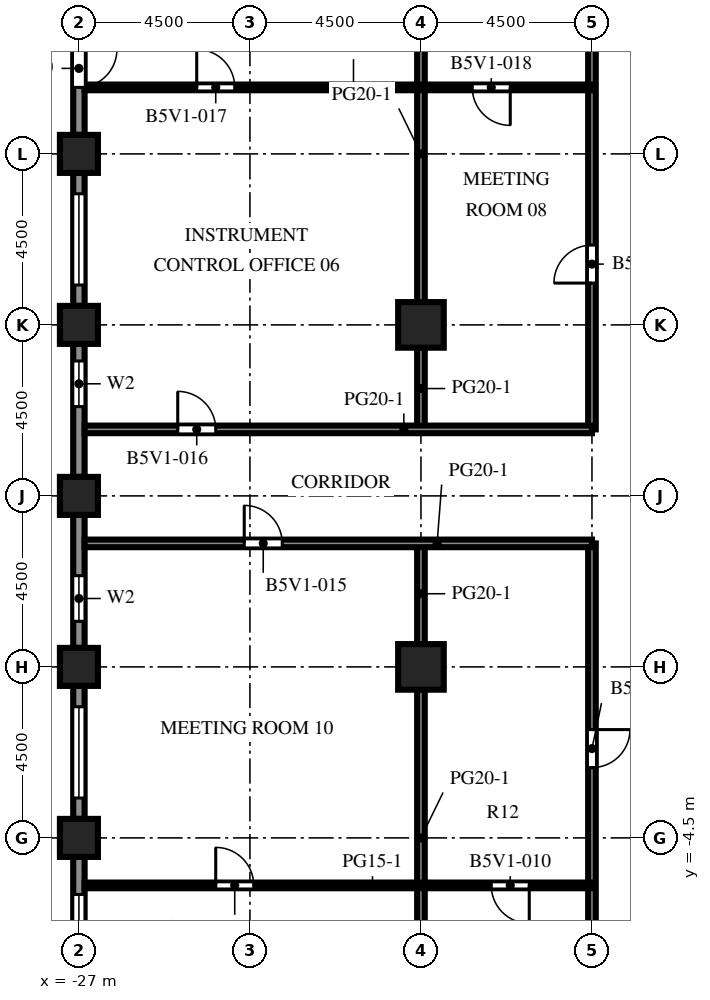
"""IFC4 building model, lengths in metres.
Left out: names, types, materials, properties, quantities, classifications, styles, units other than length and angle.
Written with IfcOpenShell. Run it as: python <this file> out.ifc"""

import sys

from ifc_helpers import new_model, si_unit, direction, frame, frame_2d, origin, origin_2d, place, context, subcontext, project, spatial, rectangle, extrude, element, fill, save


model = new_model("IFC4")
c1 = context("Model", 3, precision=1e-05, world=origin(), true_north=direction((0.0, 1.0)))
c2 = subcontext(c1, "Body", "Model", "MODEL_VIEW")
j1 = project(units=[si_unit("LENGTHUNIT", "METRE"), si_unit("PLANEANGLEUNIT", "RADIAN")], contexts=[c1])
p1 = place(None, origin())
s1 = spatial("IfcSite", under=j1, at=p1, CompositionType="ELEMENT")
p2 = place(p1, origin())
s2 = spatial("IfcBuilding", under=s1, at=p2, CompositionType="ELEMENT")
p3 = place(p2, frame((0.0, 0.0, 169.1)))
s3 = spatial("IfcBuildingStorey", under=s2, at=p3, CompositionType="ELEMENT", Elevation=169.1)
for number, where, z_axis, x_axis in (
    (1, (-27.0, -4.5, 0.0), (0.0, 0.0, 1.0), (1.0, 0.0, 0.0)),
    (2, (-27.0, 0.0, 0.0), (0.0, 0.0, 1.0), (1.0, 0.0, 0.0)),
    (3, (-27.0, 4.5, 0.0), (0.0, 0.0, 1.0), (1.0, 0.0, 0.0)),
    (4, (-27.0, 9.0, 0.0), (0.0, 0.0, 1.0), (1.0, 0.0, 0.0)),
    (5, (-27.0, 13.5, 0.0), (0.0, 0.0, 1.0), (1.0, 0.0, 0.0)),
):
    element("IfcColumn", number, at=place(p3, frame(where, z_axis=z_axis, x_axis=x_axis)), inside=s3, PredefinedType="COLUMN", context=c2, shape_type="SweptSolid", body=[
        extrude(rectangle(XDim=1.0, YDim=1.0, at=origin_2d()), origin(), (0.0, 0.0, 1.0), 4.1),
    ])
for number, where, z_axis, x_axis in (
    (6, (-18.0, 0.0, 0.0), (0.0, 0.0, 1.0), (1.0, 0.0, 0.0)),
    (7, (-18.0, 9.0, 0.0), (0.0, 0.0, 1.0), (1.0, 0.0, 0.0)),
):
    element("IfcColumn", number, at=place(p3, frame(where, z_axis=z_axis, x_axis=x_axis)), inside=s3, PredefinedType="COLUMN", context=c2, shape_type="SweptSolid", body=[
        extrude(rectangle(XDim=1.2, YDim=1.2, at=origin_2d()), origin(), (0.0, 0.0, 1.0), 4.1),
    ])
p4 = place(p3, frame((-27.0, 14.0, 0.0), z_axis=(0.0, 0.0, 1.0), x_axis=(0.0, 1.0, 0.0)))
e8 = element("IfcWall", 8, at=p4, inside=s3, PredefinedType="SOLIDWALL", context=c2, shape_type="SweptSolid", body=[
    extrude(rectangle(XDim=3.5, YDim=0.3, at=frame_2d((1.75, 0.0))), origin(), (0.0, 0.0, 1.0), 2.85),
])
p5 = place(p4, frame((1.25, 0.0, 0.0)))
e9 = element("IfcOpeningElement", 9, at=p5, cuts=e8, PredefinedType="OPENING", context=c2, shape_type="SweptSolid", body=[
    extrude(rectangle(XDim=1.0, YDim=2.2, at=frame_2d((0.5, 1.1))), frame((0.0, 0.16, 0.0), z_axis=(0.0, -1.0, 0.0), x_axis=(1.0, 0.0, 0.0)), (0.0, 0.0, 1.0), 0.32),
])
p6 = place(p3, frame((-27.0, 9.5, 0.0), z_axis=(0.0, 0.0, 1.0), x_axis=(0.0, 1.0, 0.0)))
e10 = element("IfcWall", 10, at=p6, inside=s3, PredefinedType="SOLIDWALL", context=c2, shape_type="SweptSolid", body=[
    extrude(rectangle(XDim=3.5, YDim=0.3, at=frame_2d((1.75, 0.0))), origin(), (0.0, 0.0, 1.0), 2.85),
])
p7 = place(p6, frame((0.55, 0.0, 0.8)))
e11 = element("IfcOpeningElement", 11, at=p7, cuts=e10, PredefinedType="OPENING", context=c2, shape_type="SweptSolid", body=[
    extrude(rectangle(XDim=2.4, YDim=1.7, at=frame_2d((1.2, 0.85))), frame((0.0, 0.16, 0.0), z_axis=(0.0, -1.0, 0.0), x_axis=(1.0, 0.0, 0.0)), (0.0, 0.0, 1.0), 0.32),
])
p8 = place(p3, frame((-27.0, 5.0, 0.0), z_axis=(0.0, 0.0, 1.0), x_axis=(0.0, 1.0, 0.0)))
e12 = element("IfcWall", 12, at=p8, inside=s3, PredefinedType="SOLIDWALL", context=c2, shape_type="SweptSolid", body=[
    extrude(rectangle(XDim=3.5, YDim=0.3, at=frame_2d((1.75, 0.0))), origin(), (0.0, 0.0, 1.0), 2.85),
])
p9 = place(p8, frame((1.85, 0.0, 0.8)))
e13 = element("IfcOpeningElement", 13, at=p9, cuts=e12, PredefinedType="OPENING", context=c2, shape_type="SweptSolid", body=[
    extrude(rectangle(XDim=1.2, YDim=1.7, at=frame_2d((0.6, 0.85))), frame((0.0, 0.16, 0.0), z_axis=(0.0, -1.0, 0.0), x_axis=(1.0, 0.0, 0.0)), (0.0, 0.0, 1.0), 0.32),
])
p10 = place(p3, frame((-27.0, 0.5, 0.0), z_axis=(0.0, 0.0, 1.0), x_axis=(0.0, 1.0, 0.0)))
e14 = element("IfcWall", 14, at=p10, inside=s3, PredefinedType="SOLIDWALL", context=c2, shape_type="SweptSolid", body=[
    extrude(rectangle(XDim=3.5, YDim=0.3, at=frame_2d((1.75, 0.0))), origin(), (0.0, 0.0, 1.0), 2.85),
])
p11 = place(p10, frame((0.7, 0.0, 0.8)))
e15 = element("IfcOpeningElement", 15, at=p11, cuts=e14, PredefinedType="OPENING", context=c2, shape_type="SweptSolid", body=[
    extrude(rectangle(XDim=1.2, YDim=1.7, at=frame_2d((0.6, 0.85))), frame((0.0, 0.16, 0.0), z_axis=(0.0, -1.0, 0.0), x_axis=(1.0, 0.0, 0.0)), (0.0, 0.0, 1.0), 0.32),
])
p12 = place(p3, frame((-27.0, -4.0, 0.0), z_axis=(0.0, 0.0, 1.0), x_axis=(0.0, 1.0, 0.0)))
e16 = element("IfcWall", 16, at=p12, inside=s3, PredefinedType="SOLIDWALL", context=c2, shape_type="SweptSolid", body=[
    extrude(rectangle(XDim=3.5, YDim=0.3, at=frame_2d((1.75, 0.0))), origin(), (0.0, 0.0, 1.0), 2.85),
])
p13 = place(p12, frame((0.55, 0.0, 0.8)))
e17 = element("IfcOpeningElement", 17, at=p13, cuts=e16, PredefinedType="OPENING", context=c2, shape_type="SweptSolid", body=[
    extrude(rectangle(XDim=2.4, YDim=1.7, at=frame_2d((1.2, 0.85))), frame((0.0, 0.16, 0.0), z_axis=(0.0, -1.0, 0.0), x_axis=(1.0, 0.0, 0.0)), (0.0, 0.0, 1.0), 0.32),
])
p14 = place(p3, frame((-27.0, -8.5, 0.0), z_axis=(0.0, 0.0, 1.0), x_axis=(0.0, 1.0, 0.0)))
e18 = element("IfcWall", 18, at=p14, inside=s3, PredefinedType="SOLIDWALL", context=c2, shape_type="SweptSolid", body=[
    extrude(rectangle(XDim=3.5, YDim=0.3, at=frame_2d((1.75, 0.0))), origin(), (0.0, 0.0, 1.0), 2.85),
])
p15 = place(p14, frame((0.113, 0.0, 0.8)))
e19 = element("IfcOpeningElement", 19, at=p15, cuts=e18, PredefinedType="OPENING", context=c2, shape_type="SweptSolid", body=[
    extrude(rectangle(XDim=2.4, YDim=1.7, at=frame_2d((1.2, 0.85))), frame((0.0, 0.16, 0.0), z_axis=(0.0, -1.0, 0.0), x_axis=(1.0, 0.0, 0.0)), (0.0, 0.0, 1.0), 0.32),
])
p16 = place(p3, frame((-18.0, -8.4, 0.0), z_axis=(0.0, 0.0, 1.0), x_axis=(0.0, 1.0, 0.0)))
e20 = element("IfcWall", 20, at=p16, inside=s3, PredefinedType="PARTITIONING", context=c2, shape_type="SweptSolid", body=[
    extrude(rectangle(XDim=7.8, YDim=0.2, at=frame_2d((3.9, 0.0))), origin(), (0.0, 0.0, 1.0), 3.65),
])
p17 = place(p3, frame((-18.0, 0.6, 0.0), z_axis=(0.0, 0.0, 1.0), x_axis=(0.0, 1.0, 0.0)))
e21 = element("IfcWall", 21, at=p17, inside=s3, PredefinedType="PARTITIONING", context=c2, shape_type="SweptSolid", body=[
    extrude(rectangle(XDim=2.65, YDim=0.2, at=frame_2d((1.325, 0.0))), origin(), (0.0, 0.0, 1.0), 3.65),
])
p18 = place(p3, frame((-18.0, 6.25, 0.0), z_axis=(0.0, 0.0, 1.0), x_axis=(0.0, 1.0, 0.0)))
e22 = element("IfcWall", 22, at=p18, inside=s3, PredefinedType="PARTITIONING", context=c2, shape_type="SweptSolid", body=[
    extrude(rectangle(XDim=2.15, YDim=0.2, at=frame_2d((1.075, 0.0))), origin(), (0.0, 0.0, 1.0), 3.65),
])
p19 = place(p3, frame((-18.0, 9.6, 0.0), z_axis=(0.0, 0.0, 1.0), x_axis=(0.0, 1.0, 0.0)))
e23 = element("IfcWall", 23, at=p19, inside=s3, PredefinedType="PARTITIONING", context=c2, shape_type="SweptSolid", body=[
    extrude(rectangle(XDim=7.8, YDim=0.2, at=frame_2d((3.9, 0.0))), origin(), (0.0, 0.0, 1.0), 3.65),
])
p20 = place(p3, frame((-13.5, -26.5, 0.0), z_axis=(0.0, 0.0, 1.0), x_axis=(0.0, 1.0, 0.0)))
e24 = element("IfcWall", 24, at=p20, inside=s3, PredefinedType="PARTITIONING", context=c2, shape_type="SweptSolid", body=[
    extrude(rectangle(XDim=29.75, YDim=0.2, at=frame_2d((14.875, 0.0))), origin(), (0.0, 0.0, 1.0), 3.65),
])
p21 = place(p20, frame((23.85, 0.0, 0.0)))
e25 = element("IfcOpeningElement", 25, at=p21, cuts=e24, PredefinedType="OPENING", context=c2, shape_type="SweptSolid", body=[
    extrude(rectangle(XDim=1.0, YDim=2.1, at=frame_2d((0.5, 1.05))), frame((0.0, 0.11, 0.0), z_axis=(0.0, -1.0, 0.0), x_axis=(1.0, 0.0, 0.0)), (0.0, 0.0, 1.0), 0.22),
])
p22 = place(p3, frame((-13.5, 6.25, 0.0), z_axis=(0.0, 0.0, 1.0), x_axis=(0.0, 1.0, 0.0)))
e26 = element("IfcWall", 26, at=p22, inside=s3, PredefinedType="PARTITIONING", context=c2, shape_type="SweptSolid", body=[
    extrude(rectangle(XDim=20.25, YDim=0.2, at=frame_2d((10.125, 0.0))), origin(), (0.0, 0.0, 1.0), 3.65),
])
p23 = place(p22, frame((3.85, 0.0, 0.0)))
e27 = element("IfcOpeningElement", 27, at=p23, cuts=e26, PredefinedType="OPENING", context=c2, shape_type="SweptSolid", body=[
    extrude(rectangle(XDim=1.0, YDim=2.1, at=frame_2d((0.5, 1.05))), frame((0.0, 0.11, 0.0), z_axis=(0.0, -1.0, 0.0), x_axis=(1.0, 0.0, 0.0)), (0.0, 0.0, 1.0), 0.22),
])
p24 = place(p3, frame((-13.5, -5.75, 0.0), z_axis=(0.0, 0.0, 1.0), x_axis=(-1.0, 0.0, 0.0)))
e28 = element("IfcWall", 28, at=p24, inside=s3, PredefinedType="PARTITIONING", context=c2, shape_type="SweptSolid", body=[
    extrude(rectangle(XDim=13.35, YDim=0.15, at=frame_2d((6.675, 0.0))), origin(), (0.0, 0.0, 1.0), 3.65),
])
p25 = place(p24, frame((8.9, 0.0, 0.0)))
e29 = element("IfcOpeningElement", 29, at=p25, cuts=e28, PredefinedType="OPENING", context=c2, shape_type="SweptSolid", body=[
    extrude(rectangle(XDim=1.0, YDim=2.1, at=frame_2d((0.5, 1.05))), frame((0.0, 0.085, 0.0), z_axis=(0.0, -1.0, 0.0), x_axis=(1.0, 0.0, 0.0)), (0.0, 0.0, 1.0), 0.17),
])
p26 = place(p24, frame((1.65, 0.0, 0.0)))
e30 = element("IfcOpeningElement", 30, at=p26, cuts=e28, PredefinedType="OPENING", context=c2, shape_type="SweptSolid", body=[
    extrude(rectangle(XDim=1.0, YDim=2.1, at=frame_2d((0.5, 1.05))), frame((0.0, 0.085, 0.0), z_axis=(0.0, -1.0, 0.0), x_axis=(1.0, 0.0, 0.0)), (0.0, 0.0, 1.0), 0.17),
])
p27 = place(p3, frame((-13.5, 3.25, 0.0), z_axis=(0.0, 0.0, 1.0), x_axis=(-1.0, 0.0, 0.0)))
e31 = element("IfcWall", 31, at=p27, inside=s3, PredefinedType="PARTITIONING", context=c2, shape_type="SweptSolid", body=[
    extrude(rectangle(XDim=13.35, YDim=0.2, at=frame_2d((6.675, 0.0))), origin(), (0.0, 0.0, 1.0), 3.65),
])
p28 = place(p27, frame((8.15, 0.0, 0.0)))
e32 = element("IfcOpeningElement", 32, at=p28, cuts=e31, PredefinedType="OPENING", context=c2, shape_type="SweptSolid", body=[
    extrude(rectangle(XDim=1.0, YDim=2.1, at=frame_2d((0.5, 1.05))), frame((0.0, 0.11, 0.0), z_axis=(0.0, -1.0, 0.0), x_axis=(1.0, 0.0, 0.0)), (0.0, 0.0, 1.0), 0.22),
])
p29 = place(p3, frame((-26.85, 6.25, 0.0), z_axis=(0.0, 0.0, 1.0), x_axis=(1.0, 0.0, 0.0)))
e33 = element("IfcWall", 33, at=p29, inside=s3, PredefinedType="PARTITIONING", context=c2, shape_type="SweptSolid", body=[
    extrude(rectangle(XDim=13.35, YDim=0.2, at=frame_2d((6.675, 0.0))), origin(), (0.0, 0.0, 1.0), 3.65),
])
p30 = place(p29, frame((2.45, 0.0, 0.0)))
e34 = element("IfcOpeningElement", 34, at=p30, cuts=e33, PredefinedType="OPENING", context=c2, shape_type="SweptSolid", body=[
    extrude(rectangle(XDim=1.0, YDim=2.1, at=frame_2d((0.5, 1.05))), frame((0.0, 0.11, 0.0), z_axis=(0.0, -1.0, 0.0), x_axis=(1.0, 0.0, 0.0)), (0.0, 0.0, 1.0), 0.22),
])
p31 = place(p3, frame((-26.85, 15.25, 0.0), z_axis=(0.0, 0.0, 1.0), x_axis=(1.0, 0.0, 0.0)))
e35 = element("IfcWall", 35, at=p31, inside=s3, PredefinedType="PARTITIONING", context=c2, shape_type="SweptSolid", body=[
    extrude(rectangle(XDim=13.35, YDim=0.15, at=frame_2d((6.675, 0.0))), origin(), (0.0, 0.0, 1.0), 3.65),
])
p32 = place(p31, frame((2.95, 0.0, 0.0)))
e36 = element("IfcOpeningElement", 36, at=p32, cuts=e35, PredefinedType="OPENING", context=c2, shape_type="SweptSolid", body=[
    extrude(rectangle(XDim=1.0, YDim=2.1, at=frame_2d((0.5, 1.05))), frame((0.0, 0.085, 0.0), z_axis=(0.0, -1.0, 0.0), x_axis=(1.0, 0.0, 0.0)), (0.0, 0.0, 1.0), 0.17),
])
p33 = place(p31, frame((10.2, 0.0, 0.0)))
e37 = element("IfcOpeningElement", 37, at=p33, cuts=e35, PredefinedType="OPENING", context=c2, shape_type="SweptSolid", body=[
    extrude(rectangle(XDim=1.0, YDim=2.1, at=frame_2d((0.5, 1.05))), frame((0.0, 0.085, 0.0), z_axis=(0.0, -1.0, 0.0), x_axis=(1.0, 0.0, 0.0)), (0.0, 0.0, 1.0), 0.17),
])
p34 = place(p5, origin())
e38 = element("IfcDoor", 38, at=p34, inside=s3, OperationType="SINGLE_SWING_RIGHT", PredefinedType="DOOR", context=c2, shape_type="SweptSolid", body=[
    extrude(rectangle(XDim=1.0, YDim=2.2, at=frame_2d((0.5, 1.1))), frame((0.0, 0.025, 0.0), z_axis=(0.0, -1.0, 0.0), x_axis=(1.0, 0.0, 0.0)), (0.0, 0.0, 1.0), 0.05),
])
fill(e9, e38)
p35 = place(p7, origin())
e39 = element("IfcWindow", 39, at=p35, inside=s3, PartitioningType="SINGLE_PANEL", PredefinedType="WINDOW", context=c2, shape_type="SweptSolid", body=[
    extrude(rectangle(XDim=2.4, YDim=1.7, at=frame_2d((1.2, 0.85))), frame((0.0, 0.03, 0.0), z_axis=(0.0, -1.0, 0.0), x_axis=(1.0, 0.0, 0.0)), (0.0, 0.0, 1.0), 0.06),
])
fill(e11, e39)
p36 = place(p9, origin())
e40 = element("IfcWindow", 40, at=p36, inside=s3, PartitioningType="SINGLE_PANEL", PredefinedType="WINDOW", context=c2, shape_type="SweptSolid", body=[
    extrude(rectangle(XDim=1.2, YDim=1.7, at=frame_2d((0.6, 0.85))), frame((0.0, 0.03, 0.0), z_axis=(0.0, -1.0, 0.0), x_axis=(1.0, 0.0, 0.0)), (0.0, 0.0, 1.0), 0.06),
])
fill(e13, e40)
p37 = place(p11, origin())
e41 = element("IfcWindow", 41, at=p37, inside=s3, PartitioningType="SINGLE_PANEL", PredefinedType="WINDOW", context=c2, shape_type="SweptSolid", body=[
    extrude(rectangle(XDim=1.2, YDim=1.7, at=frame_2d((0.6, 0.85))), frame((0.0, 0.03, 0.0), z_axis=(0.0, -1.0, 0.0), x_axis=(1.0, 0.0, 0.0)), (0.0, 0.0, 1.0), 0.06),
])
fill(e15, e41)
p38 = place(p13, origin())
e42 = element("IfcWindow", 42, at=p38, inside=s3, PartitioningType="SINGLE_PANEL", PredefinedType="WINDOW", context=c2, shape_type="SweptSolid", body=[
    extrude(rectangle(XDim=2.4, YDim=1.7, at=frame_2d((1.2, 0.85))), frame((0.0, 0.03, 0.0), z_axis=(0.0, -1.0, 0.0), x_axis=(1.0, 0.0, 0.0)), (0.0, 0.0, 1.0), 0.06),
])
fill(e17, e42)
p39 = place(p15, origin())
e43 = element("IfcWindow", 43, at=p39, inside=s3, PartitioningType="SINGLE_PANEL", PredefinedType="WINDOW", context=c2, shape_type="SweptSolid", body=[
    extrude(rectangle(XDim=2.4, YDim=1.7, at=frame_2d((1.2, 0.85))), frame((0.0, 0.03, 0.0), z_axis=(0.0, -1.0, 0.0), x_axis=(1.0, 0.0, 0.0)), (0.0, 0.0, 1.0), 0.06),
])
fill(e19, e43)
p40 = place(p21, origin())
e44 = element("IfcDoor", 44, at=p40, inside=s3, OperationType="SINGLE_SWING_RIGHT", PredefinedType="DOOR", context=c2, shape_type="SweptSolid", body=[
    extrude(rectangle(XDim=1.0, YDim=2.1, at=frame_2d((0.5, 1.05))), frame((0.0, 0.025, 0.0), z_axis=(0.0, -1.0, 0.0), x_axis=(1.0, 0.0, 0.0)), (0.0, 0.0, 1.0), 0.05),
])
fill(e25, e44)
p41 = place(p23, origin())
e45 = element("IfcDoor", 45, at=p41, inside=s3, OperationType="SINGLE_SWING_LEFT", PredefinedType="DOOR", context=c2, shape_type="SweptSolid", body=[
    extrude(rectangle(XDim=1.0, YDim=2.1, at=frame_2d((0.5, 1.05))), frame((0.0, 0.025, 0.0), z_axis=(0.0, -1.0, 0.0), x_axis=(1.0, 0.0, 0.0)), (0.0, 0.0, 1.0), 0.05),
])
fill(e27, e45)
p42 = place(p25, origin())
e46 = element("IfcDoor", 46, at=p42, inside=s3, OperationType="SINGLE_SWING_RIGHT", PredefinedType="DOOR", context=c2, shape_type="SweptSolid", body=[
    extrude(rectangle(XDim=1.0, YDim=2.1, at=frame_2d((0.5, 1.05))), frame((0.0, 0.025, 0.0), z_axis=(0.0, -1.0, 0.0), x_axis=(1.0, 0.0, 0.0)), (0.0, 0.0, 1.0), 0.05),
])
fill(e29, e46)
p43 = place(p26, origin())
e47 = element("IfcDoor", 47, at=p43, inside=s3, OperationType="SINGLE_SWING_LEFT", PredefinedType="DOOR", context=c2, shape_type="SweptSolid", body=[
    extrude(rectangle(XDim=1.0, YDim=2.1, at=frame_2d((0.5, 1.05))), frame((0.0, 0.025, 0.0), z_axis=(0.0, -1.0, 0.0), x_axis=(1.0, 0.0, 0.0)), (0.0, 0.0, 1.0), 0.05),
])
fill(e30, e47)
p44 = place(p28, origin())
e48 = element("IfcDoor", 48, at=p44, inside=s3, OperationType="SINGLE_SWING_RIGHT", PredefinedType="DOOR", context=c2, shape_type="SweptSolid", body=[
    extrude(rectangle(XDim=1.0, YDim=2.1, at=frame_2d((0.5, 1.05))), frame((0.0, 0.025, 0.0), z_axis=(0.0, -1.0, 0.0), x_axis=(1.0, 0.0, 0.0)), (0.0, 0.0, 1.0), 0.05),
])
fill(e32, e48)
p45 = place(p30, origin())
e49 = element("IfcDoor", 49, at=p45, inside=s3, OperationType="SINGLE_SWING_LEFT", PredefinedType="DOOR", context=c2, shape_type="SweptSolid", body=[
    extrude(rectangle(XDim=1.0, YDim=2.1, at=frame_2d((0.5, 1.05))), frame((0.0, 0.025, 0.0), z_axis=(0.0, -1.0, 0.0), x_axis=(1.0, 0.0, 0.0)), (0.0, 0.0, 1.0), 0.05),
])
fill(e34, e49)
p46 = place(p32, origin())
e50 = element("IfcDoor", 50, at=p46, inside=s3, OperationType="SINGLE_SWING_LEFT", PredefinedType="DOOR", context=c2, shape_type="SweptSolid", body=[
    extrude(rectangle(XDim=1.0, YDim=2.1, at=frame_2d((0.5, 1.05))), frame((0.0, 0.025, 0.0), z_axis=(0.0, -1.0, 0.0), x_axis=(1.0, 0.0, 0.0)), (0.0, 0.0, 1.0), 0.05),
])
fill(e36, e50)
p47 = place(p33, origin())
e51 = element("IfcDoor", 51, at=p47, inside=s3, OperationType="SINGLE_SWING_RIGHT", PredefinedType="DOOR", context=c2, shape_type="SweptSolid", body=[
    extrude(rectangle(XDim=1.0, YDim=2.1, at=frame_2d((0.5, 1.05))), frame((0.0, 0.025, 0.0), z_axis=(0.0, -1.0, 0.0), x_axis=(1.0, 0.0, 0.0)), (0.0, 0.0, 1.0), 0.05),
])
fill(e37, e51)
save(model, sys.argv[1])
